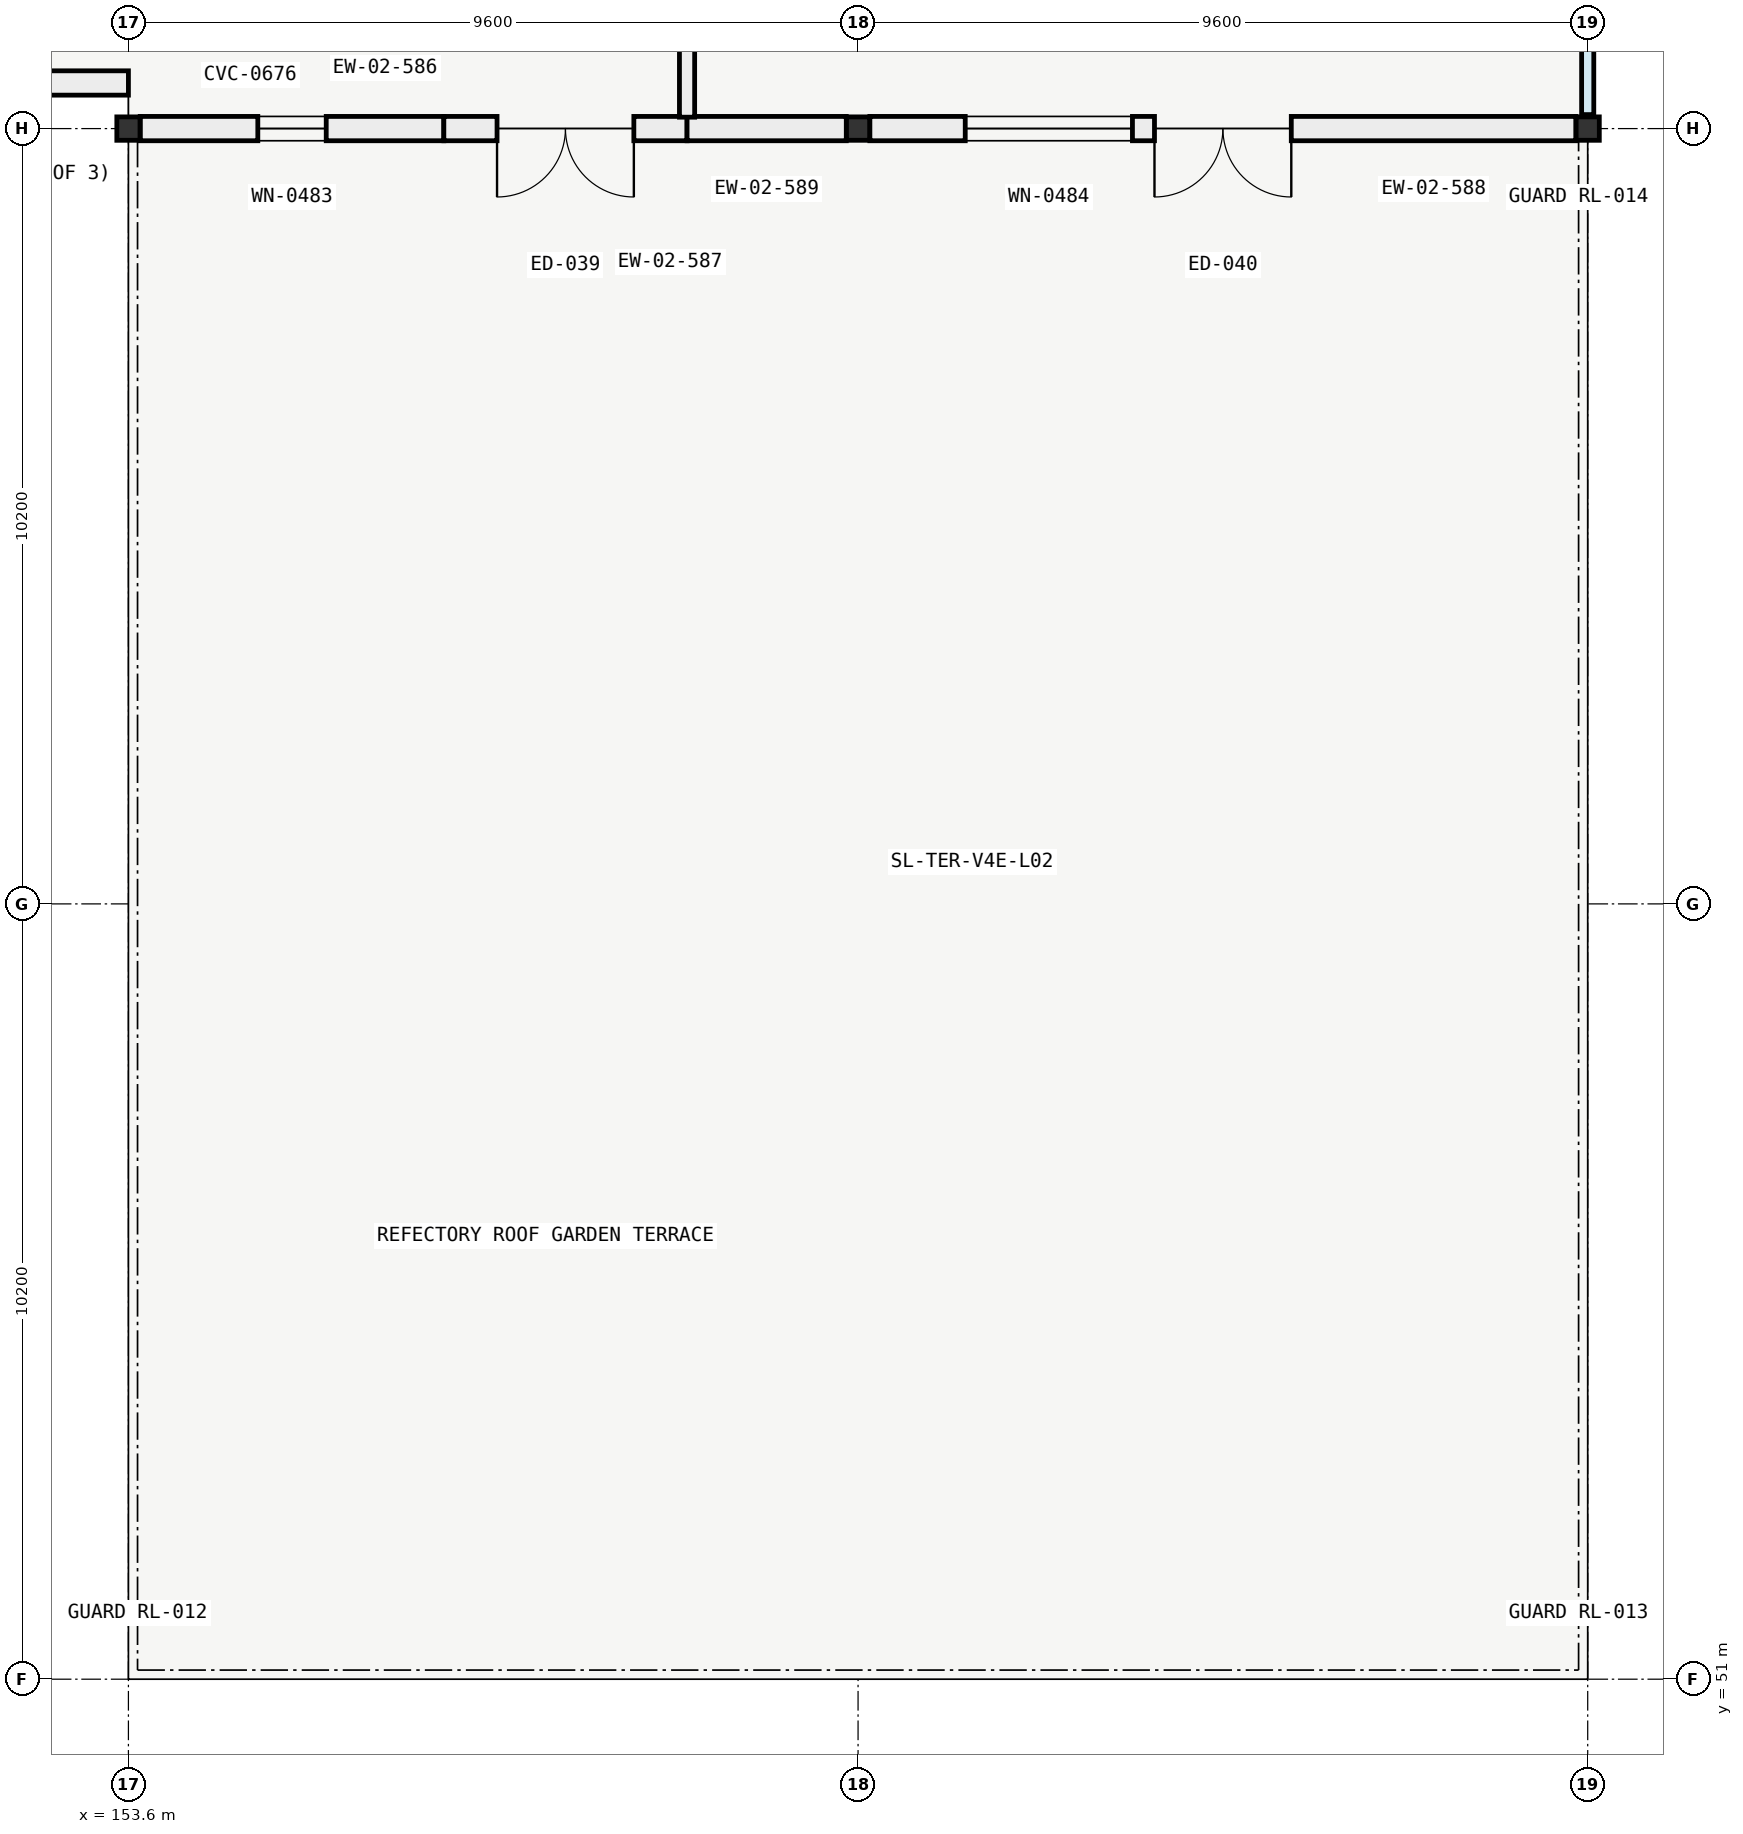
"""IFC4 building model, lengths in metres.
Left out: names, types, materials, properties, quantities, classifications, styles, units other than length and angle.
Written with IfcOpenShell. Run it as: python <this file> out.ifc"""

import sys

from ifc_helpers import new_model, si_unit, direction, frame, frame_2d, origin, origin_2d, place, context, subcontext, project, spatial, rectangle, i_section, extrude, element, fill, save


model = new_model("IFC4")
c1 = context("Model", 3, precision=1e-05, world=origin(), true_north=direction((0.0, 1.0)))
c2 = subcontext(c1, "Body", "Model", "MODEL_VIEW")
j1 = project(units=[si_unit("LENGTHUNIT", "METRE"), si_unit("PLANEANGLEUNIT", "RADIAN")], contexts=[c1])
p1 = place(None, origin())
s1 = spatial("IfcSite", under=j1, at=p1, CompositionType="ELEMENT")
p2 = place(p1, origin())
s2 = spatial("IfcBuilding", under=s1, at=p2, CompositionType="ELEMENT")
p3 = place(p2, frame((0.0, 0.0, 9.6)))
s3 = spatial("IfcBuildingStorey", under=s2, at=p3, CompositionType="ELEMENT", Elevation=9.6)
for number, where, z_axis, x_axis in (
    (1, (153.6, 71.4, 0.0), (0.0, 0.0, 1.0), (1.0, 0.0, 0.0)),
    (2, (163.2, 71.4, 0.0), (0.0, 0.0, 1.0), (1.0, 0.0, 0.0)),
    (3, (172.8, 71.4, 0.0), (0.0, 0.0, 1.0), (1.0, 0.0, 0.0)),
):
    element("IfcColumn", number, at=place(p3, frame(where, z_axis=z_axis, x_axis=x_axis)), inside=s3, PredefinedType="COLUMN", context=c2, shape_type="SweptSolid", body=[
        extrude(i_section(OverallWidth=0.305, OverallDepth=0.308, WebThickness=0.01, FlangeThickness=0.015, FilletRadius=0.017, at=origin_2d()), origin(), (0.0, 0.0, 1.0), 4.02),
    ])
p4 = place(p3, frame((157.75, 71.4, 0.0), z_axis=(0.0, 0.0, 1.0), x_axis=(-1.0, 0.0, 0.0)))
e4 = element("IfcWall", 4, at=p4, inside=s3, PredefinedType="SOLIDWALL", context=c2, shape_type="SweptSolid", body=[
    extrude(rectangle(XDim=3.995, YDim=0.32, at=frame_2d((1.998, 0.0))), origin(), (0.0, 0.0, 1.0), 3.821),
])
p5 = place(p4, frame((1.548, 0.0, 0.85)))
e5 = element("IfcOpeningElement", 5, at=p5, cuts=e4, PredefinedType="OPENING", context=c2, shape_type="SweptSolid", body=[
    extrude(rectangle(XDim=0.9, YDim=2.2, at=frame_2d((0.45, 1.1))), frame((0.0, 0.17, 0.0), z_axis=(0.0, -1.0, 0.0), x_axis=(1.0, 0.0, 0.0)), (0.0, 0.0, 1.0), 0.34),
])
p6 = place(p3, frame((160.95, 71.4, 0.0), z_axis=(0.0, 0.0, 1.0), x_axis=(-1.0, 0.0, 0.0)))
e6 = element("IfcWall", 6, at=p6, inside=s3, PredefinedType="SOLIDWALL", context=c2, shape_type="SweptSolid", body=[
    extrude(rectangle(XDim=3.2, YDim=0.32, at=frame_2d((1.6, 0.0))), origin(), (0.0, 0.0, 1.0), 3.821),
])
p7 = place(p6, frame((0.7, 0.0, 0.0)))
e7 = element("IfcOpeningElement", 7, at=p7, cuts=e6, PredefinedType="OPENING", context=c2, shape_type="SweptSolid", body=[
    extrude(rectangle(XDim=1.8, YDim=2.2, at=frame_2d((0.9, 1.1))), frame((0.0, 0.17, 0.0), z_axis=(0.0, -1.0, 0.0), x_axis=(1.0, 0.0, 0.0)), (0.0, 0.0, 1.0), 0.34),
])
p8 = place(p3, frame((172.645, 71.4, 0.0), z_axis=(0.0, 0.0, 1.0), x_axis=(-1.0, 0.0, 0.0)))
e8 = element("IfcWall", 8, at=p8, inside=s3, PredefinedType="SOLIDWALL", context=c2, shape_type="SweptSolid", body=[
    extrude(rectangle(XDim=9.29, YDim=0.32, at=frame_2d((4.645, 0.0))), origin(), (0.0, 0.0, 1.0), 3.821),
])
p9 = place(p8, frame((3.745, 0.0, 0.0)))
e9 = element("IfcOpeningElement", 9, at=p9, cuts=e8, PredefinedType="OPENING", context=c2, shape_type="SweptSolid", body=[
    extrude(rectangle(XDim=1.8, YDim=2.2, at=frame_2d((0.9, 1.1))), frame((0.0, 0.17, 0.0), z_axis=(0.0, -1.0, 0.0), x_axis=(1.0, 0.0, 0.0)), (0.0, 0.0, 1.0), 0.34),
])
p10 = place(p8, frame((5.835, 0.0, 0.85)))
e10 = element("IfcOpeningElement", 10, at=p10, cuts=e8, PredefinedType="OPENING", context=c2, shape_type="SweptSolid", body=[
    extrude(rectangle(XDim=2.2, YDim=2.3, at=frame_2d((1.1, 1.15))), frame((0.0, 0.17, 0.0), z_axis=(0.0, -1.0, 0.0), x_axis=(1.0, 0.0, 0.0)), (0.0, 0.0, 1.0), 0.34),
])
p11 = place(p3, frame((163.045, 71.4, 0.0), z_axis=(0.0, 0.0, 1.0), x_axis=(-1.0, 0.0, 0.0)))
e11 = element("IfcWall", 11, at=p11, inside=s3, PredefinedType="SOLIDWALL", context=c2, shape_type="SweptSolid", body=[
    extrude(rectangle(XDim=2.095, YDim=0.32, at=frame_2d((1.047, 0.0))), origin(), (0.0, 0.0, 1.0), 3.821),
])
p12 = place(p3, frame((153.6, 72.0, 0.0), z_axis=(0.0, 0.0, 1.0), x_axis=(-1.0, 0.0, 0.0)))
e12 = element("IfcWall", 12, at=p12, inside=s3, PredefinedType="SOLIDWALL", context=c2, shape_type="SweptSolid", body=[
    extrude(rectangle(XDim=5.299, YDim=0.32, at=frame_2d((2.649, 0.0))), origin(), (0.0, 0.0, 1.0), 3.821),
])
p13 = place(p12, frame((2.05, 0.0, 0.9)))
e13 = element("IfcOpeningElement", 13, at=p13, cuts=e12, PredefinedType="OPENING", context=c2, shape_type="SweptSolid", body=[
    extrude(rectangle(XDim=1.2, YDim=1.8, at=frame_2d((0.6, 0.9))), frame((0.0, 0.17, 0.0), z_axis=(0.0, -1.0, 0.0), x_axis=(1.0, 0.0, 0.0)), (0.0, 0.0, 1.0), 0.34),
])
p14 = place(p3, frame((160.95, 71.55, 0.0), z_axis=(0.0, 0.0, 1.0), x_axis=(0.0, 1.0, 0.0)))
e14 = element("IfcWall", 14, at=p14, inside=s3, PredefinedType="PARTITIONING", context=c2, shape_type="SweptSolid", body=[
    extrude(rectangle(XDim=20.1, YDim=0.2, at=frame_2d((10.05, 0.0))), origin(), (0.0, 0.0, 1.0), 3.821),
])
p15 = place(p14, frame((5.4, 0.0, 0.0)))
e15 = element("IfcOpeningElement", 15, at=p15, cuts=e14, PredefinedType="OPENING", context=c2, shape_type="SweptSolid", body=[
    extrude(rectangle(XDim=1.5, YDim=2.2, at=frame_2d((0.75, 1.1))), frame((0.0, 0.11, 0.0), z_axis=(0.0, -1.0, 0.0), x_axis=(1.0, 0.0, 0.0)), (0.0, 0.0, 1.0), 0.22),
])
p16 = place(p14, frame((15.6, 0.0, 0.0)))
e16 = element("IfcOpeningElement", 16, at=p16, cuts=e14, PredefinedType="OPENING", context=c2, shape_type="SweptSolid", body=[
    extrude(rectangle(XDim=0.92, YDim=2.1, at=frame_2d((0.46, 1.05))), frame((0.0, 0.11, 0.0), z_axis=(0.0, -1.0, 0.0), x_axis=(1.0, 0.0, 0.0)), (0.0, 0.0, 1.0), 0.22),
])
p17 = place(p5, origin())
e17 = element("IfcWindow", 17, at=p17, inside=s3, PartitioningType="SINGLE_PANEL", PredefinedType="WINDOW", context=c2, shape_type="SweptSolid", body=[
    extrude(rectangle(XDim=0.9, YDim=2.2, at=frame_2d((0.45, 1.1))), frame((0.0, 0.03, 0.0), z_axis=(0.0, -1.0, 0.0), x_axis=(1.0, 0.0, 0.0)), (0.0, 0.0, 1.0), 0.06),
])
fill(e5, e17)
p18 = place(p7, origin())
e18 = element("IfcDoor", 18, at=p18, inside=s3, OperationType="DOUBLE_DOOR_SINGLE_SWING", PredefinedType="DOOR", context=c2, shape_type="SweptSolid", body=[
    extrude(rectangle(XDim=1.8, YDim=2.2, at=frame_2d((0.9, 1.1))), frame((0.0, 0.025, 0.0), z_axis=(0.0, -1.0, 0.0), x_axis=(1.0, 0.0, 0.0)), (0.0, 0.0, 1.0), 0.05),
])
fill(e7, e18)
p19 = place(p9, origin())
e19 = element("IfcDoor", 19, at=p19, inside=s3, OperationType="DOUBLE_DOOR_SINGLE_SWING", PredefinedType="DOOR", context=c2, shape_type="SweptSolid", body=[
    extrude(rectangle(XDim=1.8, YDim=2.2, at=frame_2d((0.9, 1.1))), frame((0.0, 0.025, 0.0), z_axis=(0.0, -1.0, 0.0), x_axis=(1.0, 0.0, 0.0)), (0.0, 0.0, 1.0), 0.05),
])
fill(e9, e19)
p20 = place(p10, origin())
e20 = element("IfcWindow", 20, at=p20, inside=s3, PartitioningType="SINGLE_PANEL", PredefinedType="WINDOW", context=c2, shape_type="SweptSolid", body=[
    extrude(rectangle(XDim=2.2, YDim=2.3, at=frame_2d((1.1, 1.15))), frame((0.0, 0.03, 0.0), z_axis=(0.0, -1.0, 0.0), x_axis=(1.0, 0.0, 0.0)), (0.0, 0.0, 1.0), 0.06),
])
fill(e10, e20)
save(model, sys.argv[1])
